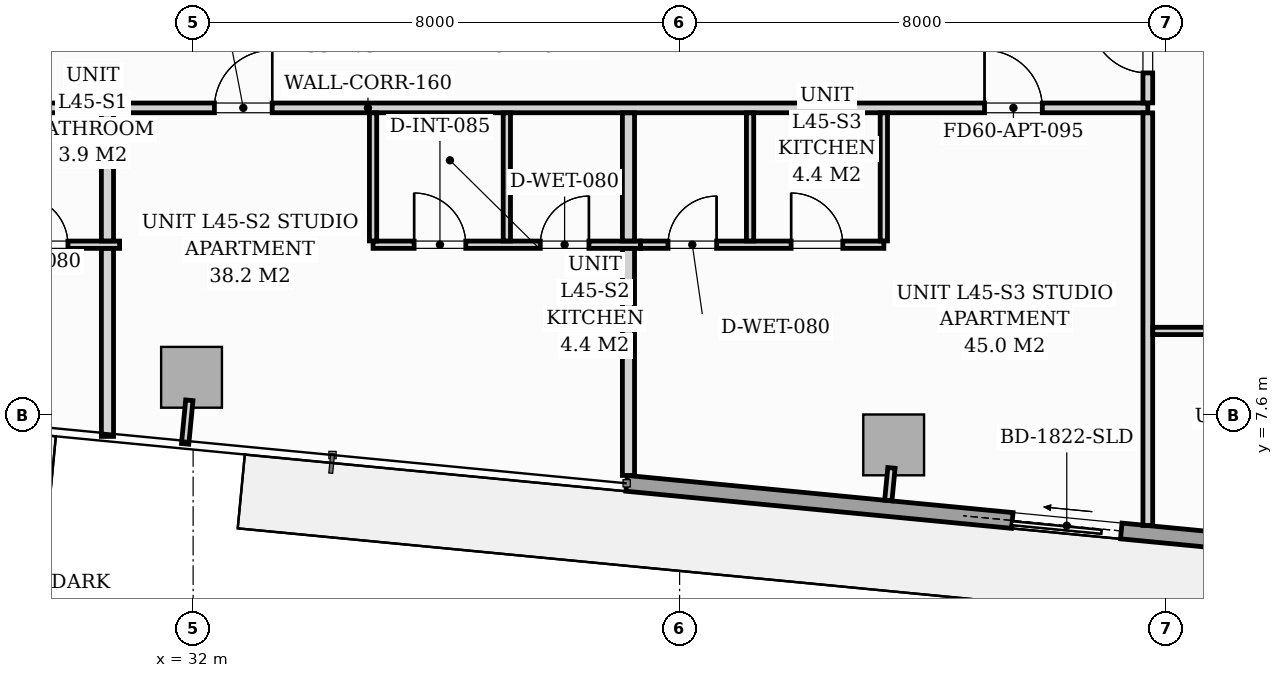
"""IFC4 building model, lengths in metres.
Left out: names, types, materials, properties, quantities, classifications, styles, units other than length and angle.
Written with IfcOpenShell. Run it as: python <this file> out.ifc"""

import sys

from ifc_helpers import new_model, si_unit, direction, frame, frame_2d, origin, origin_2d, place, context, subcontext, project, spatial, rectangle, extrude, source, transform, mapped, element, fill, save


model = new_model("IFC4")
c1 = context("Model", 3, precision=1e-05, world=origin(), true_north=direction((0.0, 1.0)))
c2 = subcontext(c1, "Body", "Model", "MODEL_VIEW")
j1 = project(units=[si_unit("LENGTHUNIT", "METRE"), si_unit("PLANEANGLEUNIT", "RADIAN")], contexts=[c1])
p1 = place(None, origin())
s1 = spatial("IfcSite", under=j1, at=p1, CompositionType="ELEMENT")
p2 = place(p1, origin())
s2 = spatial("IfcBuilding", under=s1, at=p2, CompositionType="ELEMENT")
p3 = place(p2, frame((0.0, 0.0, 156.6)))
s3 = spatial("IfcBuildingStorey", under=s2, at=p3, CompositionType="ELEMENT", Elevation=156.6)
m1 = source(origin(), c2, "Body", "SweptSolid", [
    extrude(rectangle(XDim=1.0, YDim=1.0, at=origin_2d()), origin(), (0.0, 0.0, 1.0), 3.196),
])
for number, where, z_axis, x_axis in (
    (1, (31.974, 8.22, 0.002), (0.0, 0.0, 1.0), (0.995, -0.096, 0.0)),
    (2, (43.521, 7.108, 0.002), (0.0, 0.0, 1.0), (0.995, -0.096, 0.0)),
):
    element("IfcColumn", number, at=place(p3, frame(where, z_axis=z_axis, x_axis=x_axis)), inside=s3, PredefinedType="COLUMN", context=c2, shape_type="MappedRepresentation", body=[
        mapped(m1, transform((0.0, 0.0, 0.0), scale=1.0)),
    ])
p4 = place(p3, frame((56.061, 4.845, 0.0), z_axis=(0.0, 0.0, 1.0), x_axis=(-0.995395976631, 0.095848055311, 0.0)))
e3 = element("IfcWall", 3, at=p4, inside=s3, PredefinedType="STANDARD", context=c2, shape_type="SweptSolid", body=[
    extrude(rectangle(XDim=17.01, YDim=0.26, at=frame_2d((8.505, 0.0))), origin(), (0.0, 0.0, 1.0), 2.94),
])
p5 = place(p4, frame((8.839, 0.0, 0.0)))
e4 = element("IfcOpeningElement", 4, at=p5, cuts=e3, PredefinedType="OPENING", context=c2, shape_type="SweptSolid", body=[
    extrude(rectangle(XDim=1.8, YDim=2.06, at=frame_2d((0.9, 1.03))), frame((0.0, 0.14, 0.0), z_axis=(0.0, -1.0, 0.0), x_axis=(1.0, 0.0, 0.0)), (0.0, 0.0, 1.0), 0.28),
])
p6 = place(p4, frame((2.05, 0.0, 0.65)))
e5 = element("IfcOpeningElement", 5, at=p6, cuts=e3, PredefinedType="OPENING", context=c2, shape_type="SweptSolid", body=[
    extrude(rectangle(XDim=1.6, YDim=1.5, at=frame_2d((0.8, 0.75))), frame((0.0, 0.14, 0.0), z_axis=(0.0, -1.0, 0.0), x_axis=(1.0, 0.0, 0.0)), (0.0, 0.0, 1.0), 0.28),
])
p7 = place(p3, frame((22.05, 12.65, 0.0), z_axis=(0.0, 0.0, 1.0), x_axis=(1.0, 0.0, 0.0)))
e6 = element("IfcWall", 6, at=p7, inside=s3, PredefinedType="PARTITIONING", context=c2, shape_type="SweptSolid", body=[
    extrude(rectangle(XDim=25.65, YDim=0.16, at=frame_2d((12.825, 0.0))), origin(), (0.0, 0.0, 1.0), 2.94),
])
p8 = place(p7, frame((1.736, 0.0, 0.0)))
e7 = element("IfcOpeningElement", 7, at=p8, cuts=e6, PredefinedType="OPENING", context=c2, shape_type="SweptSolid", body=[
    extrude(rectangle(XDim=0.95, YDim=2.06, at=frame_2d((0.475, 1.03))), frame((0.0, 0.09, 0.0), z_axis=(0.0, -1.0, 0.0), x_axis=(1.0, 0.0, 0.0)), (0.0, 0.0, 1.0), 0.18),
])
p9 = place(p7, frame((10.3, 0.0, 0.0)))
e8 = element("IfcOpeningElement", 8, at=p9, cuts=e6, PredefinedType="OPENING", context=c2, shape_type="SweptSolid", body=[
    extrude(rectangle(XDim=0.95, YDim=2.06, at=frame_2d((0.475, 1.03))), frame((0.0, 0.09, 0.0), z_axis=(0.0, -1.0, 0.0), x_axis=(1.0, 0.0, 0.0)), (0.0, 0.0, 1.0), 0.18),
])
p10 = place(p7, frame((22.965, 0.0, 0.0)))
e9 = element("IfcOpeningElement", 9, at=p10, cuts=e6, PredefinedType="OPENING", context=c2, shape_type="SweptSolid", body=[
    extrude(rectangle(XDim=0.95, YDim=2.06, at=frame_2d((0.475, 1.03))), frame((0.0, 0.09, 0.0), z_axis=(0.0, -1.0, 0.0), x_axis=(1.0, 0.0, 0.0)), (0.0, 0.0, 1.0), 0.18),
])
p11 = place(p3, frame((47.7, 5.783, 0.0), z_axis=(0.0, 0.0, 1.0), x_axis=(0.0, 1.0, 0.0)))
e10 = element("IfcWall", 10, at=p11, inside=s3, PredefinedType="PARTITIONING", context=c2, shape_type="SweptSolid", body=[
    extrude(rectangle(XDim=6.785, YDim=0.16, at=frame_2d((3.393, 0.0))), origin(), (0.0, 0.0, 1.0), 2.94),
])
p12 = place(p3, frame((47.7, 12.732, 0.0), z_axis=(0.0, 0.0, 1.0), x_axis=(0.0, 1.0, 0.0)))
e11 = element("IfcWall", 11, at=p12, inside=s3, PredefinedType="PARTITIONING", context=c2, shape_type="SweptSolid", body=[
    extrude(rectangle(XDim=7.918, YDim=0.16, at=frame_2d((3.959, 0.0))), origin(), (0.0, 0.0, 1.0), 2.94),
])
p13 = place(p12, frame((0.493, 0.0, 0.0)))
e12 = element("IfcOpeningElement", 12, at=p13, cuts=e11, PredefinedType="OPENING", context=c2, shape_type="SweptSolid", body=[
    extrude(rectangle(XDim=0.95, YDim=2.06, at=frame_2d((0.475, 1.03))), frame((0.0, 0.09, 0.0), z_axis=(0.0, -1.0, 0.0), x_axis=(1.0, 0.0, 0.0)), (0.0, 0.0, 1.0), 0.18),
])
p14 = place(p12, frame((6.311, 0.0, 0.0)))
e13 = element("IfcOpeningElement", 13, at=p14, cuts=e11, PredefinedType="OPENING", context=c2, shape_type="SweptSolid", body=[
    extrude(rectangle(XDim=0.95, YDim=2.06, at=frame_2d((0.475, 1.03))), frame((0.0, 0.09, 0.0), z_axis=(0.0, -1.0, 0.0), x_axis=(1.0, 0.0, 0.0)), (0.0, 0.0, 1.0), 0.18),
])
p15 = place(p3, frame((26.391, 10.4, 0.0), z_axis=(0.0, 0.0, 1.0), x_axis=(1.0, 0.0, 0.0)))
e14 = element("IfcWall", 14, at=p15, inside=s3, PredefinedType="PARTITIONING", context=c2, shape_type="SweptSolid", body=[
    extrude(rectangle(XDim=4.4, YDim=0.12, at=frame_2d((2.2, 0.0))), origin(), (0.0, 0.0, 1.0), 2.94),
])
p16 = place(p15, frame((0.675, 0.0, 0.0)))
e15 = element("IfcOpeningElement", 15, at=p16, cuts=e14, PredefinedType="OPENING", context=c2, shape_type="SweptSolid", body=[
    extrude(rectangle(XDim=0.85, YDim=2.05, at=frame_2d((0.425, 1.025))), frame((0.0, 0.07, 0.0), z_axis=(0.0, -1.0, 0.0), x_axis=(1.0, 0.0, 0.0)), (0.0, 0.0, 1.0), 0.14),
])
p17 = place(p15, frame((2.75, 0.0, 0.0)))
e16 = element("IfcOpeningElement", 16, at=p17, cuts=e14, PredefinedType="OPENING", context=c2, shape_type="SweptSolid", body=[
    extrude(rectangle(XDim=0.8, YDim=2.02, at=frame_2d((0.4, 1.01))), frame((0.0, 0.07, 0.0), z_axis=(0.0, -1.0, 0.0), x_axis=(1.0, 0.0, 0.0)), (0.0, 0.0, 1.0), 0.14),
])
p18 = place(p3, frame((30.591, 7.248, 0.0), z_axis=(0.0, 0.0, 1.0), x_axis=(0.0, 1.0, 0.0)))
e17 = element("IfcWall", 17, at=p18, inside=s3, PredefinedType="PARTITIONING", context=c2, shape_type="SweptSolid", body=[
    extrude(rectangle(XDim=3.09, YDim=0.2, at=frame_2d((1.545, 0.0))), origin(), (0.0, 0.0, 1.0), 2.94),
])
p19 = place(p3, frame((30.591, 10.462, 0.0), z_axis=(0.0, 0.0, 1.0), x_axis=(0.0, 1.0, 0.0)))
e18 = element("IfcWall", 18, at=p19, inside=s3, PredefinedType="PARTITIONING", context=c2, shape_type="SweptSolid", body=[
    extrude(rectangle(XDim=2.106, YDim=0.2, at=frame_2d((1.053, 0.0))), origin(), (0.0, 0.0, 1.0), 2.94),
])
p20 = place(p3, frame((34.959, 10.4, 0.0), z_axis=(0.0, 0.0, 1.0), x_axis=(1.0, 0.0, 0.0)))
e19 = element("IfcWall", 19, at=p20, inside=s3, PredefinedType="PARTITIONING", context=c2, shape_type="SweptSolid", body=[
    extrude(rectangle(XDim=4.4, YDim=0.12, at=frame_2d((2.2, 0.0))), origin(), (0.0, 0.0, 1.0), 2.94),
])
p21 = place(p20, frame((0.675, 0.0, 0.0)))
e20 = element("IfcOpeningElement", 20, at=p21, cuts=e19, PredefinedType="OPENING", context=c2, shape_type="SweptSolid", body=[
    extrude(rectangle(XDim=0.85, YDim=2.05, at=frame_2d((0.425, 1.025))), frame((0.0, 0.07, 0.0), z_axis=(0.0, -1.0, 0.0), x_axis=(1.0, 0.0, 0.0)), (0.0, 0.0, 1.0), 0.14),
])
p22 = place(p20, frame((2.75, 0.0, 0.0)))
e21 = element("IfcOpeningElement", 21, at=p22, cuts=e19, PredefinedType="OPENING", context=c2, shape_type="SweptSolid", body=[
    extrude(rectangle(XDim=0.8, YDim=2.02, at=frame_2d((0.4, 1.01))), frame((0.0, 0.07, 0.0), z_axis=(0.0, -1.0, 0.0), x_axis=(1.0, 0.0, 0.0)), (0.0, 0.0, 1.0), 0.14),
])
for number, where, z_axis, x_axis in (
    (22, (34.959, 10.462, 0.0), (0.0, 0.0, 1.0), (0.0, 1.0, 0.0)),
    (23, (37.159, 10.462, 0.0), (0.0, 0.0, 1.0), (0.0, 1.0, 0.0)),
):
    element("IfcWall", number, at=place(p3, frame(where, z_axis=z_axis, x_axis=x_axis)), inside=s3, PredefinedType="PARTITIONING", context=c2, shape_type="SweptSolid", body=[
        extrude(rectangle(XDim=2.106, YDim=0.12, at=frame_2d((1.053, 0.0))), origin(), (0.0, 0.0, 1.0), 2.94),
    ])
p23 = place(p3, frame((39.159, 6.606, 0.0), z_axis=(0.0, 0.0, 1.0), x_axis=(0.0, 1.0, 0.0)))
e24 = element("IfcWall", 24, at=p23, inside=s3, PredefinedType="PARTITIONING", context=c2, shape_type="SweptSolid", body=[
    extrude(rectangle(XDim=3.732, YDim=0.2, at=frame_2d((1.866, 0.0))), origin(), (0.0, 0.0, 1.0), 2.94),
])
p24 = place(p3, frame((39.159, 10.462, 0.0), z_axis=(0.0, 0.0, 1.0), x_axis=(0.0, 1.0, 0.0)))
e25 = element("IfcWall", 25, at=p24, inside=s3, PredefinedType="PARTITIONING", context=c2, shape_type="SweptSolid", body=[
    extrude(rectangle(XDim=2.106, YDim=0.2, at=frame_2d((1.053, 0.0))), origin(), (0.0, 0.0, 1.0), 2.94),
])
p25 = place(p3, frame((39.359, 10.4, 0.0), z_axis=(0.0, 0.0, 1.0), x_axis=(1.0, 0.0, 0.0)))
e26 = element("IfcWall", 26, at=p25, inside=s3, PredefinedType="PARTITIONING", context=c2, shape_type="SweptSolid", body=[
    extrude(rectangle(XDim=4.0, YDim=0.12, at=frame_2d((2.0, 0.0))), origin(), (0.0, 0.0, 1.0), 2.94),
])
p26 = place(p25, frame((0.45, 0.0, 0.0)))
e27 = element("IfcOpeningElement", 27, at=p26, cuts=e26, PredefinedType="OPENING", context=c2, shape_type="SweptSolid", body=[
    extrude(rectangle(XDim=0.8, YDim=2.02, at=frame_2d((0.4, 1.01))), frame((0.0, 0.07, 0.0), z_axis=(0.0, -1.0, 0.0), x_axis=(1.0, 0.0, 0.0)), (0.0, 0.0, 1.0), 0.14),
])
p27 = place(p25, frame((2.475, 0.0, 0.0)))
e28 = element("IfcOpeningElement", 28, at=p27, cuts=e26, PredefinedType="OPENING", context=c2, shape_type="SweptSolid", body=[
    extrude(rectangle(XDim=0.85, YDim=2.05, at=frame_2d((0.425, 1.025))), frame((0.0, 0.07, 0.0), z_axis=(0.0, -1.0, 0.0), x_axis=(1.0, 0.0, 0.0)), (0.0, 0.0, 1.0), 0.14),
])
for number, where, z_axis, x_axis in (
    (29, (43.359, 10.462, 0.0), (0.0, 0.0, 1.0), (0.0, 1.0, 0.0)),
    (30, (41.159, 10.462, 0.0), (0.0, 0.0, 1.0), (0.0, 1.0, 0.0)),
):
    element("IfcWall", number, at=place(p3, frame(where, z_axis=z_axis, x_axis=x_axis)), inside=s3, PredefinedType="PARTITIONING", context=c2, shape_type="SweptSolid", body=[
        extrude(rectangle(XDim=2.106, YDim=0.12, at=frame_2d((1.053, 0.0))), origin(), (0.0, 0.0, 1.0), 2.94),
    ])
p28 = place(p3, frame((47.782, 8.982, 0.0), z_axis=(0.0, 0.0, 1.0), x_axis=(1.0, 0.0, 0.0)))
e31 = element("IfcWall", 31, at=p28, inside=s3, PredefinedType="PARTITIONING", context=c2, shape_type="SweptSolid", body=[
    extrude(rectangle(XDim=8.788, YDim=0.12, at=frame_2d((4.394, 0.0))), origin(), (0.0, 0.0, 1.0), 2.94),
])
p29 = place(p28, frame((3.969, 0.0, 0.0)))
e32 = element("IfcOpeningElement", 32, at=p29, cuts=e31, PredefinedType="OPENING", context=c2, shape_type="SweptSolid", body=[
    extrude(rectangle(XDim=0.85, YDim=2.05, at=frame_2d((0.425, 1.025))), frame((0.0, 0.07, 0.0), z_axis=(0.0, -1.0, 0.0), x_axis=(1.0, 0.0, 0.0)), (0.0, 0.0, 1.0), 0.14),
])
p30 = place(p3, frame((31.938, 7.841, 0.0), z_axis=(0.0, 0.0, 1.0), x_axis=(-0.095977354523, -0.995383517755, 0.0)))
e33 = element("IfcWall", 33, at=p30, inside=s3, PredefinedType="PARTITIONING", context=c2, shape_type="SweptSolid", body=[
    extrude(rectangle(XDim=0.72, YDim=0.12, at=frame_2d((0.36, 0.0))), origin(), (0.0, 0.0, 1.0), 2.94),
])
p31 = place(p3, frame((43.484, 6.729, 0.0), z_axis=(0.0, 0.0, 1.0), x_axis=(-0.095772948675, -0.995403205893, 0.0)))
e34 = element("IfcWall", 34, at=p31, inside=s3, PredefinedType="PARTITIONING", context=c2, shape_type="SweptSolid", body=[
    extrude(rectangle(XDim=0.538, YDim=0.12, at=frame_2d((0.269, 0.0))), origin(), (0.0, 0.0, 1.0), 2.94),
])
m2 = source(origin(), c2, "Body", "SweptSolid", [
    extrude(rectangle(XDim=1.8, YDim=2.06, at=frame_2d((0.9, 1.03))), frame((0.0, 0.025, 0.0), z_axis=(0.0, -1.0, 0.0), x_axis=(1.0, 0.0, 0.0)), (0.0, 0.0, 1.0), 0.05),
])
p32 = place(p5, origin())
e35 = element("IfcDoor", 35, at=p32, inside=s3, OperationType="SLIDING_TO_RIGHT", PredefinedType="DOOR", context=c2, shape_type="MappedRepresentation", body=[
    mapped(m2, transform((0.0, 0.0, 0.0), scale=1.0)),
])
fill(e4, e35)
m3 = source(origin(), c2, "Body", "SweptSolid", [
    extrude(rectangle(XDim=0.8, YDim=2.02, at=frame_2d((0.4, 1.01))), frame((0.0, 0.025, 0.0), z_axis=(0.0, -1.0, 0.0), x_axis=(1.0, 0.0, 0.0)), (0.0, 0.0, 1.0), 0.05),
])
p33 = place(p17, origin())
e36 = element("IfcDoor", 36, at=p33, inside=s3, OperationType="SINGLE_SWING_LEFT", PredefinedType="DOOR", context=c2, shape_type="MappedRepresentation", body=[
    mapped(m3, transform((0.0, 0.0, 0.0), scale=1.0)),
])
fill(e16, e36)
m4 = source(origin(), c2, "Body", "SweptSolid", [
    extrude(rectangle(XDim=0.95, YDim=2.06, at=frame_2d((0.475, 1.03))), frame((0.0, 0.025, 0.0), z_axis=(0.0, -1.0, 0.0), x_axis=(1.0, 0.0, 0.0)), (0.0, 0.0, 1.0), 0.05),
])
p34 = place(p9, origin())
e37 = element("IfcDoor", 37, at=p34, inside=s3, OperationType="SINGLE_SWING_RIGHT", PredefinedType="DOOR", context=c2, shape_type="MappedRepresentation", body=[
    mapped(m4, transform((0.0, 0.0, 0.0), scale=1.0)),
])
fill(e8, e37)
m5 = source(origin(), c2, "Body", "SweptSolid", [
    extrude(rectangle(XDim=0.85, YDim=2.05, at=frame_2d((0.425, 1.025))), frame((0.0, 0.025, 0.0), z_axis=(0.0, -1.0, 0.0), x_axis=(1.0, 0.0, 0.0)), (0.0, 0.0, 1.0), 0.05),
])
p35 = place(p21, origin())
e38 = element("IfcDoor", 38, at=p35, inside=s3, OperationType="SINGLE_SWING_LEFT", PredefinedType="DOOR", context=c2, shape_type="MappedRepresentation", body=[
    mapped(m5, transform((0.0, 0.0, 0.0), scale=1.0)),
])
fill(e20, e38)
p36 = place(p22, origin())
e39 = element("IfcDoor", 39, at=p36, inside=s3, OperationType="SINGLE_SWING_RIGHT", PredefinedType="DOOR", context=c2, shape_type="MappedRepresentation", body=[
    mapped(m3, transform((0.0, 0.0, 0.0), scale=1.0)),
])
fill(e21, e39)
p37 = place(p10, origin())
e40 = element("IfcDoor", 40, at=p37, inside=s3, OperationType="SINGLE_SWING_LEFT", PredefinedType="DOOR", context=c2, shape_type="MappedRepresentation", body=[
    mapped(m4, transform((0.0, 0.0, 0.0), scale=1.0)),
])
fill(e9, e40)
p38 = place(p26, origin())
e41 = element("IfcDoor", 41, at=p38, inside=s3, OperationType="SINGLE_SWING_RIGHT", PredefinedType="DOOR", context=c2, shape_type="MappedRepresentation", body=[
    mapped(m3, transform((0.0, 0.0, 0.0), scale=1.0)),
])
fill(e27, e41)
p39 = place(p27, origin())
e42 = element("IfcDoor", 42, at=p39, inside=s3, OperationType="SINGLE_SWING_LEFT", PredefinedType="DOOR", context=c2, shape_type="MappedRepresentation", body=[
    mapped(m5, transform((0.0, 0.0, 0.0), scale=1.0)),
])
fill(e28, e42)
p40 = place(p13, origin())
e43 = element("IfcDoor", 43, at=p40, inside=s3, OperationType="SINGLE_SWING_RIGHT", PredefinedType="DOOR", context=c2, shape_type="MappedRepresentation", body=[
    mapped(m4, transform((0.0, 0.0, 0.0), scale=1.0)),
])
fill(e12, e43)
save(model, sys.argv[1])
